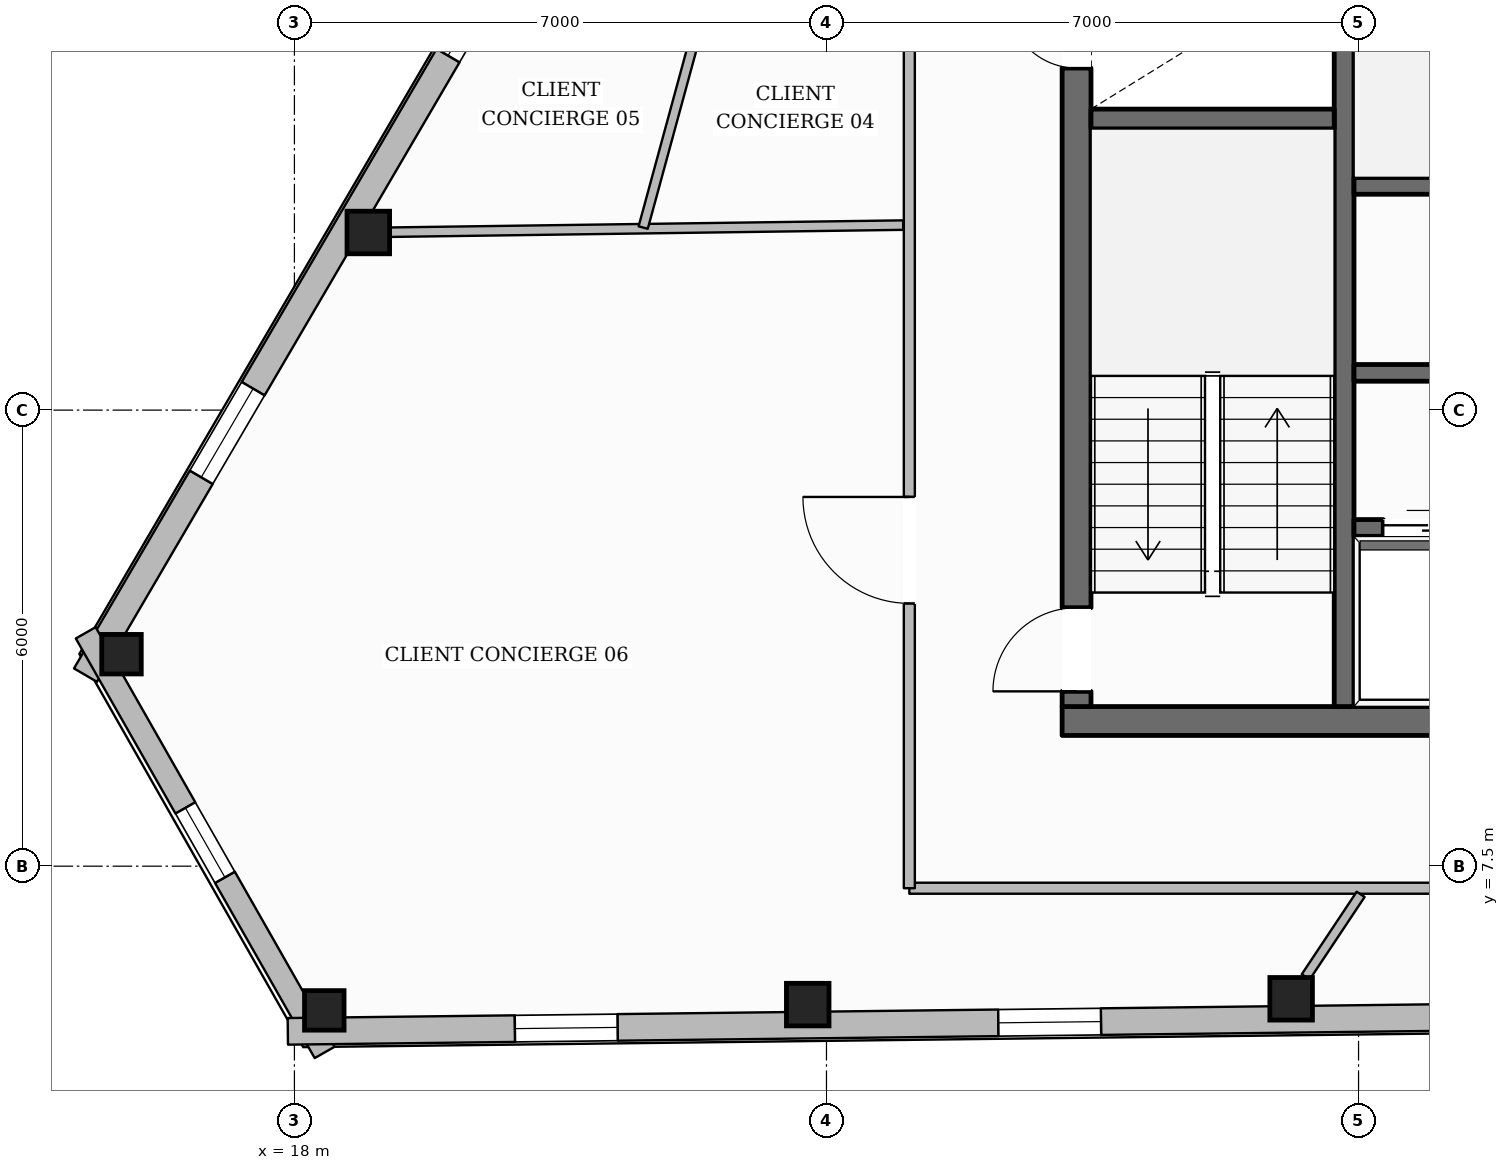
"""IFC4 building model, lengths in metres.
Left out: names, types, materials, properties, quantities, classifications, styles, units other than length and angle.
Written with IfcOpenShell. Run it as: python <this file> out.ifc"""

import sys

from ifc_helpers import new_model, si_unit, direction, frame, frame_2d, origin, origin_2d, place, context, subcontext, project, spatial, rectangle, hollow_rectangle, extrude, element, fill, save


model = new_model("IFC4")
c1 = context("Model", 3, precision=1e-05, world=origin(), true_north=direction((0.0, 1.0)))
c2 = subcontext(c1, "Body", "Model", "MODEL_VIEW")
j1 = project(units=[si_unit("LENGTHUNIT", "METRE"), si_unit("PLANEANGLEUNIT", "RADIAN")], contexts=[c1])
p1 = place(None, origin())
s1 = spatial("IfcSite", under=j1, at=p1, CompositionType="ELEMENT")
p2 = place(p1, origin())
s2 = spatial("IfcBuilding", under=s1, at=p2, CompositionType="ELEMENT")
p3 = place(p2, frame((0.0, 0.0, 289.55)))
s3 = spatial("IfcBuildingStorey", under=s2, at=p3, CompositionType="ELEMENT", Elevation=289.55)
p4 = place(p3, frame((28.1, 9.41, 0.0), z_axis=(0.0, 0.0, 1.0), x_axis=(1.0, 0.0, 0.0)))
e1 = element("IfcWall", 1, at=p4, inside=s3, PredefinedType="SOLIDWALL", context=c2, shape_type="SweptSolid", body=[
    extrude(rectangle(XDim=19.8, YDim=0.38, at=frame_2d((9.9, 0.0))), origin(), (0.0, 0.0, 1.0), 3.61),
])
p5 = place(p4, frame((10.4, 0.0, 0.0)))
e2 = element("IfcOpeningElement", 2, at=p5, cuts=e1, PredefinedType="OPENING", context=c2, shape_type="SweptSolid", body=[
    extrude(rectangle(XDim=1.4, YDim=2.2, at=frame_2d((0.7, 1.1))), frame((0.0, 0.2, 0.0), z_axis=(0.0, -1.0, 0.0), x_axis=(1.0, 0.0, 0.0)), (0.0, 0.0, 1.0), 0.4),
])
p6 = place(p3, frame((28.29, 9.6, 0.0), z_axis=(0.0, 0.0, 1.0), x_axis=(0.0, 1.0, 0.0)))
e3 = element("IfcWall", 3, at=p6, inside=s3, PredefinedType="SOLIDWALL", context=c2, shape_type="SweptSolid", body=[
    extrude(rectangle(XDim=13.0, YDim=0.38, at=frame_2d((6.5, 0.0))), origin(), (0.0, 0.0, 1.0), 3.61),
])
p7 = place(p6, frame((0.2, 0.0, 0.0)))
e4 = element("IfcOpeningElement", 4, at=p7, cuts=e3, PredefinedType="OPENING", context=c2, shape_type="SweptSolid", body=[
    extrude(rectangle(XDim=1.1, YDim=2.15, at=frame_2d((0.55, 1.075))), frame((0.0, 0.2, 0.0), z_axis=(0.0, -1.0, 0.0), x_axis=(1.0, 0.0, 0.0)), (0.0, 0.0, 1.0), 0.4),
])
p8 = place(p6, frame((8.4, 0.0, 0.0)))
e5 = element("IfcOpeningElement", 5, at=p8, cuts=e3, PredefinedType="OPENING", context=c2, shape_type="SweptSolid", body=[
    extrude(rectangle(XDim=0.9, YDim=2.1, at=frame_2d((0.45, 1.05))), frame((0.0, 0.2, 0.0), z_axis=(0.0, -1.0, 0.0), x_axis=(1.0, 0.0, 0.0)), (0.0, 0.0, 1.0), 0.4),
])
p9 = place(p3, frame((31.81, 9.6, 0.0), z_axis=(0.0, 0.0, 1.0), x_axis=(0.0, 1.0, 0.0)))
e6 = element("IfcWall", 6, at=p9, inside=s3, PredefinedType="SHEAR", context=c2, shape_type="SweptSolid", body=[
    extrude(rectangle(XDim=13.0, YDim=0.26, at=frame_2d((6.5, 0.0))), origin(), (0.0, 0.0, 1.0), 3.61),
])
p10 = place(p9, frame((10.925, 0.0, 0.0)))
e7 = element("IfcOpeningElement", 7, at=p10, cuts=e6, PredefinedType="OPENING", context=c2, shape_type="SweptSolid", body=[
    extrude(rectangle(XDim=1.25, YDim=2.25, at=frame_2d((0.625, 1.125))), frame((0.0, 0.14, 0.0), z_axis=(0.0, -1.0, 0.0), x_axis=(1.0, 0.0, 0.0)), (0.0, 0.0, 1.0), 0.28),
])
p11 = place(p3, frame((28.48, 17.33, 0.0), z_axis=(0.0, 0.0, 1.0), x_axis=(1.0, 0.0, 0.0)))
e8 = element("IfcWall", 8, at=p11, inside=s3, PredefinedType="SHEAR", context=c2, shape_type="SweptSolid", body=[
    extrude(rectangle(XDim=3.2, YDim=0.26, at=frame_2d((1.6, 0.0))), origin(), (0.0, 0.0, 1.0), 3.61),
])
p12 = place(p3, frame((31.94, 16.45, 0.0), z_axis=(0.0, 0.0, 1.0), x_axis=(1.0, 0.0, 0.0)))
e9 = element("IfcWall", 9, at=p12, inside=s3, PredefinedType="SOLIDWALL", context=c2, shape_type="SweptSolid", body=[
    extrude(rectangle(XDim=12.12, YDim=0.22, at=frame_2d((6.06, 0.0))), origin(), (0.0, 0.0, 1.0), 3.61),
])
p13 = place(p3, frame((31.94, 13.99, 0.0), z_axis=(0.0, 0.0, 1.0), x_axis=(1.0, 0.0, 0.0)))
e10 = element("IfcWall", 10, at=p13, inside=s3, PredefinedType="SOLIDWALL", context=c2, shape_type="SweptSolid", body=[
    extrude(rectangle(XDim=12.12, YDim=0.22, at=frame_2d((6.06, 0.0))), origin(), (0.0, 0.0, 1.0), 3.61),
])
p14 = place(p13, frame((1.11, 0.0, 0.0)))
e11 = element("IfcOpeningElement", 11, at=p14, cuts=e10, PredefinedType="OPENING", context=c2, shape_type="SweptSolid", body=[
    extrude(rectangle(XDim=0.9, YDim=2.1, at=frame_2d((0.45, 1.05))), frame((0.0, 0.12, 0.0), z_axis=(0.0, -1.0, 0.0), x_axis=(1.0, 0.0, 0.0)), (0.0, 0.0, 1.0), 0.24),
])
p15 = place(p13, frame((5.16, 0.0, 0.0)))
e12 = element("IfcOpeningElement", 12, at=p15, cuts=e10, PredefinedType="OPENING", context=c2, shape_type="SweptSolid", body=[
    extrude(rectangle(XDim=0.9, YDim=2.1, at=frame_2d((0.45, 1.05))), frame((0.0, 0.12, 0.0), z_axis=(0.0, -1.0, 0.0), x_axis=(1.0, 0.0, 0.0)), (0.0, 0.0, 1.0), 0.24),
])
p16 = place(p13, frame((9.61, 0.0, 0.0)))
e13 = element("IfcOpeningElement", 13, at=p16, cuts=e10, PredefinedType="OPENING", context=c2, shape_type="SweptSolid", body=[
    extrude(rectangle(XDim=0.9, YDim=2.1, at=frame_2d((0.45, 1.05))), frame((0.0, 0.12, 0.0), z_axis=(0.0, -1.0, 0.0), x_axis=(1.0, 0.0, 0.0)), (0.0, 0.0, 1.0), 0.24),
])
p17 = place(p3, frame((31.94, 11.95, 0.0), z_axis=(0.0, 0.0, 1.0), x_axis=(1.0, 0.0, 0.0)))
e14 = element("IfcWall", 14, at=p17, inside=s3, PredefinedType="SOLIDWALL", context=c2, shape_type="SweptSolid", body=[
    extrude(rectangle(XDim=6.19, YDim=0.22, at=frame_2d((3.095, 0.0))), origin(), (0.0, 0.0, 1.0), 3.61),
])
p18 = place(p17, frame((0.385, 0.0, 0.0)))
e15 = element("IfcOpeningElement", 15, at=p18, cuts=e14, PredefinedType="OPENING", context=c2, shape_type="SweptSolid", body=[
    extrude(rectangle(XDim=1.1, YDim=2.2, at=frame_2d((0.55, 1.1))), frame((0.0, 0.12, 0.0), z_axis=(0.0, -1.0, 0.0), x_axis=(1.0, 0.0, 0.0)), (0.0, 0.0, 1.0), 0.24),
])
p19 = place(p17, frame((2.435, 0.0, 0.0)))
e16 = element("IfcOpeningElement", 16, at=p19, cuts=e14, PredefinedType="OPENING", context=c2, shape_type="SweptSolid", body=[
    extrude(rectangle(XDim=1.1, YDim=2.2, at=frame_2d((0.55, 1.1))), frame((0.0, 0.12, 0.0), z_axis=(0.0, -1.0, 0.0), x_axis=(1.0, 0.0, 0.0)), (0.0, 0.0, 1.0), 0.24),
])
p20 = place(p17, frame((4.485, 0.0, 0.0)))
e17 = element("IfcOpeningElement", 17, at=p20, cuts=e14, PredefinedType="OPENING", context=c2, shape_type="SweptSolid", body=[
    extrude(rectangle(XDim=1.1, YDim=2.2, at=frame_2d((0.55, 1.1))), frame((0.0, 0.12, 0.0), z_axis=(0.0, -1.0, 0.0), x_axis=(1.0, 0.0, 0.0)), (0.0, 0.0, 1.0), 0.24),
])
p21 = place(p3, frame((18.972, 15.837, 0.0), z_axis=(0.0, 0.0, 1.0), x_axis=(1.0, 0.0, 0.0)))
e18 = element("IfcColumn", 18, at=p21, inside=s3, PredefinedType="COLUMN", context=c2, shape_type="SweptSolid", body=[
    extrude(hollow_rectangle(XDim=0.56, YDim=0.56, WallThickness=0.025, at=origin_2d()), origin(), (0.0, 0.0, 1.0), 3.61),
])
for number, where, z_axis, x_axis in (
    (19, (15.725, 10.289, 0.0), (0.0, 0.0, 1.0), (1.0, 0.0, 0.0)),
    (20, (18.393, 5.603, 0.0), (0.0, 0.0, 1.0), (1.0, 0.0, 0.0)),
):
    element("IfcColumn", number, at=place(p3, frame(where, z_axis=z_axis, x_axis=x_axis)), inside=s3, PredefinedType="COLUMN", context=c2, shape_type="SweptSolid", body=[
        extrude(hollow_rectangle(XDim=0.52, YDim=0.52, WallThickness=0.024, at=origin_2d()), origin(), (0.0, 0.0, 1.0), 3.61),
    ])
for number, where, z_axis, x_axis in (
    (21, (24.753, 5.679, 0.0), (0.0, 0.0, 1.0), (1.0, 0.0, 0.0)),
    (22, (31.113, 5.755, 0.0), (0.0, 0.0, 1.0), (1.0, 0.0, 0.0)),
):
    element("IfcColumn", number, at=place(p3, frame(where, z_axis=z_axis, x_axis=x_axis)), inside=s3, PredefinedType="COLUMN", context=c2, shape_type="SweptSolid", body=[
        extrude(hollow_rectangle(XDim=0.56, YDim=0.56, WallThickness=0.025, at=origin_2d()), origin(), (0.0, 0.0, 1.0), 3.61),
    ])
p22 = place(p3, frame((15.251, 10.013, 0.0), z_axis=(0.0, 0.0, 1.0), x_axis=(0.505125442866, 0.863045935608, 0.0)))
e23 = element("IfcWall", 23, at=p22, inside=s3, PredefinedType="STANDARD", context=c2, shape_type="SweptSolid", body=[
    extrude(rectangle(XDim=39.517, YDim=0.35, at=frame_2d((19.759, 0.0))), origin(), (0.0, 0.0, 1.0), 3.196),
])
p23 = place(p22, frame((35.157, 0.0, 0.65)))
e24 = element("IfcOpeningElement", 24, at=p23, cuts=e23, PredefinedType="OPENING", context=c2, shape_type="SweptSolid", body=[
    extrude(rectangle(XDim=1.35, YDim=1.75, at=frame_2d((0.675, 0.875))), frame((0.0, 0.185, 0.0), z_axis=(0.0, -1.0, 0.0), x_axis=(1.0, 0.0, 0.0)), (0.0, 0.0, 1.0), 0.37),
])
p24 = place(p22, frame((28.729, 0.0, 0.65)))
e25 = element("IfcOpeningElement", 25, at=p24, cuts=e23, PredefinedType="OPENING", context=c2, shape_type="SweptSolid", body=[
    extrude(rectangle(XDim=1.35, YDim=1.75, at=frame_2d((0.675, 0.875))), frame((0.0, 0.185, 0.0), z_axis=(0.0, -1.0, 0.0), x_axis=(1.0, 0.0, 0.0)), (0.0, 0.0, 1.0), 0.37),
])
p25 = place(p22, frame((15.872, 0.0, 0.65)))
e26 = element("IfcOpeningElement", 26, at=p25, cuts=e23, PredefinedType="OPENING", context=c2, shape_type="SweptSolid", body=[
    extrude(rectangle(XDim=1.35, YDim=1.75, at=frame_2d((0.675, 0.875))), frame((0.0, 0.185, 0.0), z_axis=(0.0, -1.0, 0.0), x_axis=(1.0, 0.0, 0.0)), (0.0, 0.0, 1.0), 0.37),
])
p26 = place(p22, frame((9.444, 0.0, 0.65)))
e27 = element("IfcOpeningElement", 27, at=p26, cuts=e23, PredefinedType="OPENING", context=c2, shape_type="SweptSolid", body=[
    extrude(rectangle(XDim=1.35, YDim=1.75, at=frame_2d((0.675, 0.875))), frame((0.0, 0.185, 0.0), z_axis=(0.0, -1.0, 0.0), x_axis=(1.0, 0.0, 0.0)), (0.0, 0.0, 1.0), 0.37),
])
p27 = place(p22, frame((3.016, 0.0, 0.65)))
e28 = element("IfcOpeningElement", 28, at=p27, cuts=e23, PredefinedType="OPENING", context=c2, shape_type="SweptSolid", body=[
    extrude(rectangle(XDim=1.35, YDim=1.75, at=frame_2d((0.675, 0.875))), frame((0.0, 0.185, 0.0), z_axis=(0.0, -1.0, 0.0), x_axis=(1.0, 0.0, 0.0)), (0.0, 0.0, 1.0), 0.37),
])
p28 = place(p3, frame((18.397, 5.05, 0.0), z_axis=(0.0, 0.0, 1.0), x_axis=(-0.494760013266, 0.869029648098, 0.0)))
e29 = element("IfcWall", 29, at=p28, inside=s3, PredefinedType="STANDARD", context=c2, shape_type="SweptSolid", body=[
    extrude(rectangle(XDim=6.352, YDim=0.3, at=frame_2d((3.176, 0.0))), origin(), (0.0, 0.0, 1.0), 3.196),
])
p29 = place(p28, frame((2.651, 0.0, 0.65)))
e30 = element("IfcOpeningElement", 30, at=p29, cuts=e29, PredefinedType="OPENING", context=c2, shape_type="SweptSolid", body=[
    extrude(rectangle(XDim=1.05, YDim=1.7, at=frame_2d((0.525, 0.85))), frame((0.0, 0.16, 0.0), z_axis=(0.0, -1.0, 0.0), x_axis=(1.0, 0.0, 0.0)), (0.0, 0.0, 1.0), 0.32),
])
p30 = place(p3, frame((57.028, 5.796, 0.0), z_axis=(0.0, 0.0, 1.0), x_axis=(-0.999928125145, -0.011989351295, 0.0)))
e31 = element("IfcWall", 31, at=p30, inside=s3, PredefinedType="STANDARD", context=c2, shape_type="SweptSolid", body=[
    extrude(rectangle(XDim=39.118, YDim=0.35, at=frame_2d((19.559, 0.0))), origin(), (0.0, 0.0, 1.0), 3.196),
])
p31 = place(p30, frame((34.779, 0.0, 0.65)))
e32 = element("IfcOpeningElement", 32, at=p31, cuts=e31, PredefinedType="OPENING", context=c2, shape_type="SweptSolid", body=[
    extrude(rectangle(XDim=1.35, YDim=1.75, at=frame_2d((0.675, 0.875))), frame((0.0, 0.185, 0.0), z_axis=(0.0, -1.0, 0.0), x_axis=(1.0, 0.0, 0.0)), (0.0, 0.0, 1.0), 0.37),
])
p32 = place(p30, frame((28.419, 0.0, 0.65)))
e33 = element("IfcOpeningElement", 33, at=p32, cuts=e31, PredefinedType="OPENING", context=c2, shape_type="SweptSolid", body=[
    extrude(rectangle(XDim=1.35, YDim=1.75, at=frame_2d((0.675, 0.875))), frame((0.0, 0.185, 0.0), z_axis=(0.0, -1.0, 0.0), x_axis=(1.0, 0.0, 0.0)), (0.0, 0.0, 1.0), 0.37),
])
p33 = place(p30, frame((15.698, 0.0, 0.65)))
e34 = element("IfcOpeningElement", 34, at=p33, cuts=e31, PredefinedType="OPENING", context=c2, shape_type="SweptSolid", body=[
    extrude(rectangle(XDim=1.35, YDim=1.75, at=frame_2d((0.675, 0.875))), frame((0.0, 0.185, 0.0), z_axis=(0.0, -1.0, 0.0), x_axis=(1.0, 0.0, 0.0)), (0.0, 0.0, 1.0), 0.37),
])
p34 = place(p30, frame((9.337, 0.0, 0.65)))
e35 = element("IfcOpeningElement", 35, at=p34, cuts=e31, PredefinedType="OPENING", context=c2, shape_type="SweptSolid", body=[
    extrude(rectangle(XDim=1.35, YDim=1.75, at=frame_2d((0.675, 0.875))), frame((0.0, 0.185, 0.0), z_axis=(0.0, -1.0, 0.0), x_axis=(1.0, 0.0, 0.0)), (0.0, 0.0, 1.0), 0.37),
])
p35 = place(p30, frame((2.977, 0.0, 0.65)))
e36 = element("IfcOpeningElement", 36, at=p35, cuts=e31, PredefinedType="OPENING", context=c2, shape_type="SweptSolid", body=[
    extrude(rectangle(XDim=1.35, YDim=1.75, at=frame_2d((0.675, 0.875))), frame((0.0, 0.185, 0.0), z_axis=(0.0, -1.0, 0.0), x_axis=(1.0, 0.0, 0.0)), (0.0, 0.0, 1.0), 0.37),
])
p36 = place(p3, frame((49.91, 7.21, 0.0), z_axis=(0.0, 0.0, 1.0), x_axis=(-1.0, 0.0, 0.0)))
e37 = element("IfcWall", 37, at=p36, inside=s3, PredefinedType="PARTITIONING", context=c2, shape_type="SweptSolid", body=[
    extrude(rectangle(XDim=23.82, YDim=0.145, at=frame_2d((11.91, 0.0))), origin(), (0.0, 0.0, 1.0), 3.349),
])
p37 = place(p36, frame((10.932, 0.0, 0.0)))
e38 = element("IfcOpeningElement", 38, at=p37, cuts=e37, PredefinedType="OPENING", context=c2, shape_type="SweptSolid", body=[
    extrude(rectangle(XDim=0.98, YDim=2.15, at=frame_2d((0.49, 1.075))), frame((0.0, 0.083, 0.0), z_axis=(0.0, -1.0, 0.0), x_axis=(1.0, 0.0, 0.0)), (0.0, 0.0, 1.0), 0.165),
])
p38 = place(p36, frame((2.086, 0.0, 0.0)))
e39 = element("IfcOpeningElement", 39, at=p38, cuts=e37, PredefinedType="OPENING", context=c2, shape_type="SweptSolid", body=[
    extrude(rectangle(XDim=0.98, YDim=2.15, at=frame_2d((0.49, 1.075))), frame((0.0, 0.083, 0.0), z_axis=(0.0, -1.0, 0.0), x_axis=(1.0, 0.0, 0.0)), (0.0, 0.0, 1.0), 0.165),
])
p39 = place(p3, frame((26.09, 7.21, 0.0), z_axis=(0.0, 0.0, 1.0), x_axis=(0.0, 1.0, 0.0)))
e40 = element("IfcWall", 40, at=p39, inside=s3, PredefinedType="PARTITIONING", context=c2, shape_type="SweptSolid", body=[
    extrude(rectangle(XDim=17.78, YDim=0.145, at=frame_2d((8.89, 0.0))), origin(), (0.0, 0.0, 1.0), 3.349),
])
p40 = place(p39, frame((12.676, 0.0, 0.0)))
e41 = element("IfcOpeningElement", 41, at=p40, cuts=e40, PredefinedType="OPENING", context=c2, shape_type="SweptSolid", body=[
    extrude(rectangle(XDim=0.98, YDim=2.15, at=frame_2d((0.49, 1.075))), frame((0.0, 0.083, 0.0), z_axis=(0.0, -1.0, 0.0), x_axis=(1.0, 0.0, 0.0)), (0.0, 0.0, 1.0), 0.165),
])
p41 = place(p39, frame((3.748, 0.0, 0.0)))
e42 = element("IfcOpeningElement", 42, at=p41, cuts=e40, PredefinedType="OPENING", context=c2, shape_type="SweptSolid", body=[
    extrude(rectangle(XDim=1.4, YDim=2.2, at=frame_2d((0.7, 1.1))), frame((0.0, 0.083, 0.0), z_axis=(0.0, -1.0, 0.0), x_axis=(1.0, 0.0, 0.0)), (0.0, 0.0, 1.0), 0.165),
])
p42 = place(p3, frame((26.01, 15.934, 0.0), z_axis=(0.0, 0.0, 1.0), x_axis=(-0.999904544413, -0.01381673127, 0.0)))
e43 = element("IfcWall", 43, at=p42, inside=s3, PredefinedType="PARTITIONING", context=c2, shape_type="SweptSolid", body=[
    extrude(rectangle(XDim=6.75, YDim=0.125, at=frame_2d((3.375, 0.0))), origin(), (0.0, 0.0, 1.0), 3.246),
])
p43 = place(p3, frame((32.028, 7.129, 0.0), z_axis=(0.0, 0.0, 1.0), x_axis=(-0.554181973297, -0.83239554328, 0.0)))
e44 = element("IfcWall", 44, at=p43, inside=s3, PredefinedType="PARTITIONING", context=c2, shape_type="SweptSolid", body=[
    extrude(rectangle(XDim=1.305, YDim=0.125, at=frame_2d((0.652, 0.0))), origin(), (0.0, 0.0, 1.0), 3.61),
])
p44 = place(p3, frame((25.515, 26.644, 0.0), z_axis=(0.0, 0.0, 1.0), x_axis=(-0.262861356166, -0.964833616451, 0.0)))
e45 = element("IfcWall", 45, at=p44, inside=s3, PredefinedType="PARTITIONING", context=c2, shape_type="SweptSolid", body=[
    extrude(rectangle(XDim=11.134, YDim=0.125, at=frame_2d((5.567, 0.0))), origin(), (0.0, 0.0, 1.0), 3.349),
])
p45 = place(p44, frame((4.969, 0.0, 0.0)))
e46 = element("IfcOpeningElement", 46, at=p45, cuts=e45, PredefinedType="OPENING", context=c2, shape_type="SweptSolid", body=[
    extrude(rectangle(XDim=0.98, YDim=2.15, at=frame_2d((0.49, 1.075))), frame((0.0, 0.073, 0.0), z_axis=(0.0, -1.0, 0.0), x_axis=(1.0, 0.0, 0.0)), (0.0, 0.0, 1.0), 0.145),
])
p46 = place(p26, origin())
e47 = element("IfcWindow", 47, at=p46, inside=s3, PartitioningType="SINGLE_PANEL", PredefinedType="WINDOW", context=c2, shape_type="SweptSolid", body=[
    extrude(rectangle(XDim=1.35, YDim=1.75, at=frame_2d((0.675, 0.875))), frame((0.0, 0.03, 0.0), z_axis=(0.0, -1.0, 0.0), x_axis=(1.0, 0.0, 0.0)), (0.0, 0.0, 1.0), 0.06),
])
fill(e27, e47)
p47 = place(p27, origin())
e48 = element("IfcWindow", 48, at=p47, inside=s3, PartitioningType="SINGLE_PANEL", PredefinedType="WINDOW", context=c2, shape_type="SweptSolid", body=[
    extrude(rectangle(XDim=1.35, YDim=1.75, at=frame_2d((0.675, 0.875))), frame((0.0, 0.03, 0.0), z_axis=(0.0, -1.0, 0.0), x_axis=(1.0, 0.0, 0.0)), (0.0, 0.0, 1.0), 0.06),
])
fill(e28, e48)
p48 = place(p31, origin())
e49 = element("IfcWindow", 49, at=p48, inside=s3, PartitioningType="SINGLE_PANEL", PredefinedType="WINDOW", context=c2, shape_type="SweptSolid", body=[
    extrude(rectangle(XDim=1.35, YDim=1.75, at=frame_2d((0.675, 0.875))), frame((0.0, 0.03, 0.0), z_axis=(0.0, -1.0, 0.0), x_axis=(1.0, 0.0, 0.0)), (0.0, 0.0, 1.0), 0.06),
])
fill(e32, e49)
p49 = place(p32, origin())
e50 = element("IfcWindow", 50, at=p49, inside=s3, PartitioningType="SINGLE_PANEL", PredefinedType="WINDOW", context=c2, shape_type="SweptSolid", body=[
    extrude(rectangle(XDim=1.35, YDim=1.75, at=frame_2d((0.675, 0.875))), frame((0.0, 0.03, 0.0), z_axis=(0.0, -1.0, 0.0), x_axis=(1.0, 0.0, 0.0)), (0.0, 0.0, 1.0), 0.06),
])
fill(e33, e50)
p50 = place(p29, origin())
e51 = element("IfcWindow", 51, at=p50, inside=s3, PartitioningType="SINGLE_PANEL", PredefinedType="WINDOW", context=c2, shape_type="SweptSolid", body=[
    extrude(rectangle(XDim=1.05, YDim=1.7, at=frame_2d((0.525, 0.85))), frame((0.0, 0.03, 0.0), z_axis=(0.0, -1.0, 0.0), x_axis=(1.0, 0.0, 0.0)), (0.0, 0.0, 1.0), 0.06),
])
fill(e30, e51)
p51 = place(p7, origin())
e52 = element("IfcDoor", 52, at=p51, inside=s3, OperationType="SINGLE_SWING_LEFT", PredefinedType="DOOR", context=c2, shape_type="SweptSolid", body=[
    extrude(rectangle(XDim=1.1, YDim=2.15, at=frame_2d((0.55, 1.075))), frame((0.0, 0.025, 0.0), z_axis=(0.0, -1.0, 0.0), x_axis=(1.0, 0.0, 0.0)), (0.0, 0.0, 1.0), 0.05),
])
fill(e4, e52)
p52 = place(p8, origin())
e53 = element("IfcDoor", 53, at=p52, inside=s3, OperationType="SINGLE_SWING_RIGHT", PredefinedType="DOOR", context=c2, shape_type="SweptSolid", body=[
    extrude(rectangle(XDim=0.9, YDim=2.1, at=frame_2d((0.45, 1.05))), frame((0.0, 0.025, 0.0), z_axis=(0.0, -1.0, 0.0), x_axis=(1.0, 0.0, 0.0)), (0.0, 0.0, 1.0), 0.05),
])
fill(e5, e53)
p53 = place(p18, origin())
e54 = element("IfcDoor", 54, at=p53, inside=s3, OperationType="DOUBLE_DOOR_SLIDING", PredefinedType="DOOR", context=c2, shape_type="SweptSolid", body=[
    extrude(rectangle(XDim=1.1, YDim=2.2, at=frame_2d((0.55, 1.1))), frame((0.0, 0.025, 0.0), z_axis=(0.0, -1.0, 0.0), x_axis=(1.0, 0.0, 0.0)), (0.0, 0.0, 1.0), 0.05),
])
fill(e15, e54)
p54 = place(p41, origin())
e55 = element("IfcDoor", 55, at=p54, inside=s3, OperationType="SINGLE_SWING_RIGHT", PredefinedType="DOOR", context=c2, shape_type="SweptSolid", body=[
    extrude(rectangle(XDim=1.4, YDim=2.2, at=frame_2d((0.7, 1.1))), frame((0.0, 0.025, 0.0), z_axis=(0.0, -1.0, 0.0), x_axis=(1.0, 0.0, 0.0)), (0.0, 0.0, 1.0), 0.05),
])
fill(e42, e55)
save(model, sys.argv[1])
